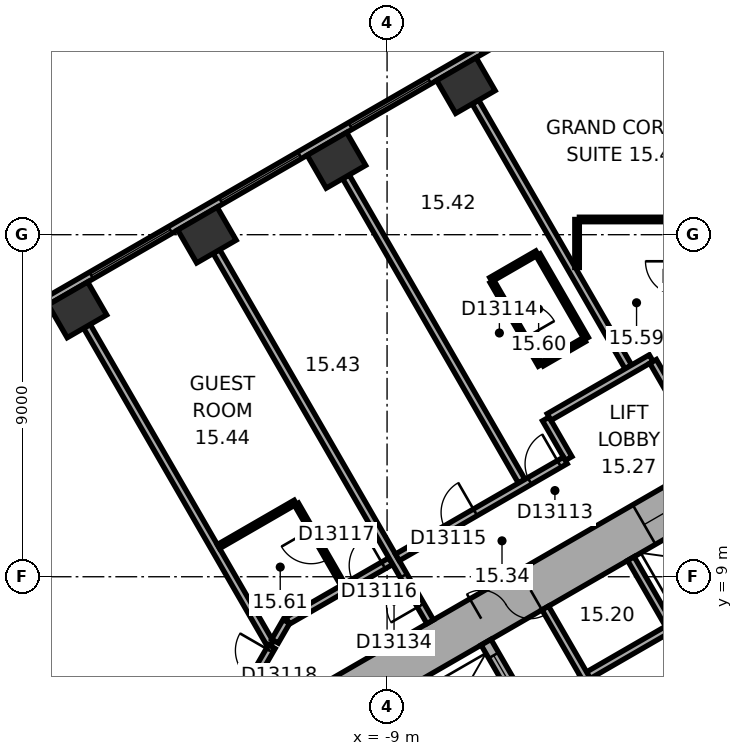
"""IFC4 building model, lengths in metres.
Left out: names, types, materials, properties, quantities, classifications, styles, units other than length and angle.
Written with IfcOpenShell. Run it as: python <this file> out.ifc"""

import sys

from ifc_helpers import new_model, si_unit, direction, frame, frame_2d, origin, origin_2d, place, context, subcontext, project, spatial, rectangle, extrude, element, fill, save


model = new_model("IFC4")
c1 = context("Model", 3, precision=1e-05, world=origin(), true_north=direction((0.0, 1.0)))
c2 = subcontext(c1, "Body", "Model", "MODEL_VIEW")
j1 = project(units=[si_unit("LENGTHUNIT", "METRE"), si_unit("PLANEANGLEUNIT", "RADIAN")], contexts=[c1])
p1 = place(None, origin())
s1 = spatial("IfcSite", under=j1, at=p1, CompositionType="ELEMENT")
p2 = place(p1, origin())
s2 = spatial("IfcBuilding", under=s1, at=p2, CompositionType="ELEMENT")
p3 = place(p2, frame((0.0, 0.0, 70.4)))
s3 = spatial("IfcBuildingStorey", under=s2, at=p3, CompositionType="ELEMENT", Elevation=70.4)
for number, where, z_axis, x_axis in (
    (1, (-6.926, 21.925, 0.0), (0.0, 0.0, 1.0), (-0.866, -0.5, 0.0)),
    (2, (-10.333, 19.957, 0.0), (0.0, 0.0, 1.0), (-0.866, -0.5, 0.0)),
    (3, (-13.74, 17.99, 0.0), (0.0, 0.0, 1.0), (-0.866, -0.5, 0.0)),
    (4, (-17.148, 16.023, 0.0), (0.0, 0.0, 1.0), (-0.866, -0.5, 0.0)),
):
    element("IfcColumn", number, at=place(p3, frame(where, z_axis=z_axis, x_axis=x_axis)), inside=s3, PredefinedType="COLUMN", context=c2, shape_type="SweptSolid", body=[
        extrude(rectangle(XDim=1.2, YDim=1.0, at=origin_2d()), origin(), (0.0, 0.0, 1.0), 3.3),
    ])
p4 = place(p3, frame((0.3, 11.836, 0.0), z_axis=(0.0, 0.0, 1.0), x_axis=(-0.866021384402, -0.500006961711, 0.0)))
e5 = element("IfcWall", 5, at=p4, inside=s3, PredefinedType="SHEAR", context=c2, shape_type="SweptSolid", body=[
    extrude(rectangle(XDim=12.355, YDim=1.2, at=frame_2d((6.178, 0.0))), origin(), (0.0, 0.0, 1.0), 3.3),
])
p5 = place(p4, frame((6.378, 0.0, 0.0)))
e6 = element("IfcOpeningElement", 6, at=p5, cuts=e5, PredefinedType="OPENING", context=c2, shape_type="SweptSolid", body=[
    extrude(rectangle(XDim=1.5, YDim=2.1, at=frame_2d((0.75, 1.05))), frame((0.0, 0.61, 0.0), z_axis=(0.0, -1.0, 0.0), x_axis=(1.0, 0.0, 0.0)), (0.0, 0.0, 1.0), 1.22),
])
p6 = place(p4, frame((1.828, 0.0, 0.0)))
e7 = element("IfcOpeningElement", 7, at=p6, cuts=e5, PredefinedType="OPENING", context=c2, shape_type="SweptSolid", body=[
    extrude(rectangle(XDim=1.1, YDim=2.1, at=frame_2d((0.55, 1.05))), frame((0.0, 0.61, 0.0), z_axis=(0.0, -1.0, 0.0), x_axis=(1.0, 0.0, 0.0)), (0.0, 0.0, 1.0), 1.22),
])
p7 = place(p3, frame((-3.136, 24.805, 0.0), z_axis=(0.0, 0.0, 1.0), x_axis=(-0.866028291626, -0.499994998079, 0.0)))
e8 = element("IfcWall", 8, at=p7, inside=s3, PredefinedType="STANDARD", context=c2, shape_type="SweptSolid", body=[
    extrude(rectangle(XDim=21.246, YDim=0.2, at=frame_2d((10.623, 0.0))), origin(), (0.0, 0.0, 1.0), 3.3),
])
p8 = place(p7, frame((1.555, 0.0, 0.8)))
e9 = element("IfcOpeningElement", 9, at=p8, cuts=e8, PredefinedType="OPENING", context=c2, shape_type="SweptSolid", body=[
    extrude(rectangle(XDim=2.4, YDim=1.7, at=frame_2d((1.2, 0.85))), frame((0.0, 0.11, 0.0), z_axis=(0.0, -1.0, 0.0), x_axis=(1.0, 0.0, 0.0)), (0.0, 0.0, 1.0), 0.22),
])
p9 = place(p7, frame((5.489, 0.0, 0.8)))
e10 = element("IfcOpeningElement", 10, at=p9, cuts=e8, PredefinedType="OPENING", context=c2, shape_type="SweptSolid", body=[
    extrude(rectangle(XDim=2.4, YDim=1.7, at=frame_2d((1.2, 0.85))), frame((0.0, 0.11, 0.0), z_axis=(0.0, -1.0, 0.0), x_axis=(1.0, 0.0, 0.0)), (0.0, 0.0, 1.0), 0.22),
])
p10 = place(p7, frame((9.424, 0.0, 0.8)))
e11 = element("IfcOpeningElement", 11, at=p10, cuts=e8, PredefinedType="OPENING", context=c2, shape_type="SweptSolid", body=[
    extrude(rectangle(XDim=2.4, YDim=1.7, at=frame_2d((1.2, 0.85))), frame((0.0, 0.11, 0.0), z_axis=(0.0, -1.0, 0.0), x_axis=(1.0, 0.0, 0.0)), (0.0, 0.0, 1.0), 0.22),
])
p11 = place(p7, frame((13.358, 0.0, 0.8)))
e12 = element("IfcOpeningElement", 12, at=p11, cuts=e8, PredefinedType="OPENING", context=c2, shape_type="SweptSolid", body=[
    extrude(rectangle(XDim=2.4, YDim=1.7, at=frame_2d((1.2, 0.85))), frame((0.0, 0.11, 0.0), z_axis=(0.0, -1.0, 0.0), x_axis=(1.0, 0.0, 0.0)), (0.0, 0.0, 1.0), 0.22),
])
p12 = place(p7, frame((17.293, 0.0, 0.8)))
e13 = element("IfcOpeningElement", 13, at=p12, cuts=e8, PredefinedType="OPENING", context=c2, shape_type="SweptSolid", body=[
    extrude(rectangle(XDim=2.4, YDim=1.7, at=frame_2d((1.2, 0.85))), frame((0.0, 0.11, 0.0), z_axis=(0.0, -1.0, 0.0), x_axis=(1.0, 0.0, 0.0)), (0.0, 0.0, 1.0), 0.22),
])
p13 = place(p3, frame((0.803, 9.009, 0.0), z_axis=(0.0, 0.0, 1.0), x_axis=(-0.866028230842, -0.499995103361, 0.0)))
e14 = element("IfcWall", 14, at=p13, inside=s3, PredefinedType="PARTITIONING", context=c2, shape_type="SweptSolid", body=[
    extrude(rectangle(XDim=5.4, YDim=0.2, at=frame_2d((2.7, 0.0))), origin(), (0.0, 0.0, 1.0), 3.05),
])
for number, where, z_axis, x_axis in (
    (15, (-1.485, 7.572, 0.0), (0.0, 0.0, 1.0), (-0.5, 0.866, 0.0)),
    (16, (-3.737, 6.272, 0.0), (0.0, 0.0, 1.0), (-0.5, 0.866, 0.0)),
):
    element("IfcWall", number, at=place(p3, frame(where, z_axis=z_axis, x_axis=x_axis)), inside=s3, PredefinedType="PARTITIONING", context=c2, shape_type="SweptSolid", body=[
        extrude(rectangle(XDim=2.2, YDim=0.2, at=frame_2d((1.1, 0.0))), origin(), (0.0, 0.0, 1.0), 3.05),
    ])
p14 = place(p3, frame((-2.216, 4.282, 0.0), z_axis=(0.0, 0.0, 1.0), x_axis=(0.499977259774, 0.866038532462, 0.0)))
e17 = element("IfcWall", 17, at=p14, inside=s3, PredefinedType="SHEAR", context=c2, shape_type="SweptSolid", body=[
    extrude(rectangle(XDim=4.7, YDim=0.3, at=frame_2d((2.35, 0.0))), origin(), (0.0, 0.0, 1.0), 3.05),
])
p15 = place(p3, frame((-5.295, 5.372, 0.0), z_axis=(0.0, 0.0, 1.0), x_axis=(-0.500077893725, 0.86598042715, 0.0)))
e18 = element("IfcWall", 18, at=p15, inside=s3, PredefinedType="SHEAR", context=c2, shape_type="SweptSolid", body=[
    extrude(rectangle(XDim=2.2, YDim=0.3, at=frame_2d((1.1, 0.0))), origin(), (0.0, 0.0, 1.0), 3.05),
])
p16 = place(p15, frame((0.7, 0.0, 0.0)))
e19 = element("IfcOpeningElement", 19, at=p16, cuts=e18, PredefinedType="OPENING", context=c2, shape_type="SweptSolid", body=[
    extrude(rectangle(XDim=1.1, YDim=2.1, at=frame_2d((0.55, 1.05))), frame((0.0, 0.16, 0.0), z_axis=(0.0, -1.0, 0.0), x_axis=(1.0, 0.0, 0.0)), (0.0, 0.0, 1.0), 0.32),
])
p17 = place(p3, frame((-16.898, 15.59, 0.0), z_axis=(0.0, 0.0, 1.0), x_axis=(0.499994742786, -0.866028439017, 0.0)))
e20 = element("IfcWall", 20, at=p17, inside=s3, PredefinedType="PARTITIONING", context=c2, shape_type="SweptSolid", body=[
    extrude(rectangle(XDim=9.65, YDim=0.2, at=frame_2d((4.825, 0.0))), origin(), (0.0, 0.0, 1.0), 3.05),
])
p18 = place(p3, frame((-13.436, 9.794, 0.0), z_axis=(0.0, 0.0, 1.0), x_axis=(0.866053246676, 0.499951771596, 0.0)))
e21 = element("IfcWall", 21, at=p18, inside=s3, PredefinedType="PARTITIONING", context=c2, shape_type="SweptSolid", body=[
    extrude(rectangle(XDim=2.335, YDim=0.12, at=frame_2d((1.167, 0.0))), origin(), (0.0, 0.0, 1.0), 3.05),
])
p19 = place(p3, frame((-12.032, 7.162, 0.0), z_axis=(0.0, 0.0, 1.0), x_axis=(-0.499951829968, -0.866053212979, 0.0)))
e22 = element("IfcWall", 22, at=p19, inside=s3, PredefinedType="PARTITIONING", context=c2, shape_type="SweptSolid", body=[
    extrude(rectangle(XDim=1.136, YDim=0.2, at=frame_2d((0.568, 0.0))), origin(), (0.0, 0.0, 1.0), 3.05),
])
p20 = place(p19, frame((0.118, 0.0, 0.0)))
e23 = element("IfcOpeningElement", 23, at=p20, cuts=e22, PredefinedType="OPENING", context=c2, shape_type="SweptSolid", body=[
    extrude(rectangle(XDim=0.9, YDim=2.1, at=frame_2d((0.45, 1.05))), frame((0.0, 0.11, 0.0), z_axis=(0.0, -1.0, 0.0), x_axis=(1.0, 0.0, 0.0)), (0.0, 0.0, 1.0), 0.22),
])
p21 = place(p3, frame((-11.65, 7.823, 0.0), z_axis=(0.0, 0.0, 1.0), x_axis=(-0.50012165622, -0.865955154139, 0.0)))
e24 = element("IfcWall", 24, at=p21, inside=s3, PredefinedType="PARTITIONING", context=c2, shape_type="SweptSolid", body=[
    extrude(rectangle(XDim=0.6, YDim=0.2, at=frame_2d((0.3, 0.0))), origin(), (0.0, 0.0, 1.0), 3.05),
])
p22 = place(p3, frame((-11.385, 10.909, 0.0), z_axis=(0.0, 0.0, 1.0), x_axis=(0.500077547548, -0.865980627057, 0.0)))
e25 = element("IfcWall", 25, at=p22, inside=s3, PredefinedType="PARTITIONING", context=c2, shape_type="SweptSolid", body=[
    extrude(rectangle(XDim=2.44, YDim=0.12, at=frame_2d((1.22, 0.0))), origin(), (0.0, 0.0, 1.0), 3.05),
])
p23 = place(p22, frame((0.77, 0.0, 0.0)))
e26 = element("IfcOpeningElement", 26, at=p23, cuts=e25, PredefinedType="OPENING", context=c2, shape_type="SweptSolid", body=[
    extrude(rectangle(XDim=0.9, YDim=2.1, at=frame_2d((0.45, 1.05))), frame((0.0, 0.07, 0.0), z_axis=(0.0, -1.0, 0.0), x_axis=(1.0, 0.0, 0.0)), (0.0, 0.0, 1.0), 0.14),
])
p24 = place(p3, frame((-10.083, 19.524, 0.0), z_axis=(0.0, 0.0, 1.0), x_axis=(0.499999662836, -0.866025598446, 0.0)))
e27 = element("IfcWall", 27, at=p24, inside=s3, PredefinedType="PARTITIONING", context=c2, shape_type="SweptSolid", body=[
    extrude(rectangle(XDim=9.25, YDim=0.2, at=frame_2d((4.625, 0.0))), origin(), (0.0, 0.0, 1.0), 2.6),
])
p25 = place(p3, frame((-8.902, 9.41, 0.0), z_axis=(0.0, 0.0, 1.0), x_axis=(-0.866014299198, -0.500019233215, 0.0)))
e28 = element("IfcWall", 28, at=p25, inside=s3, PredefinedType="PARTITIONING", context=c2, shape_type="SweptSolid", body=[
    extrude(rectangle(XDim=3.133, YDim=0.2, at=frame_2d((1.567, 0.0))), origin(), (0.0, 0.0, 1.0), 3.05),
])
p26 = place(p25, frame((0.225, 0.0, 0.0)))
e29 = element("IfcOpeningElement", 29, at=p26, cuts=e28, PredefinedType="OPENING", context=c2, shape_type="SweptSolid", body=[
    extrude(rectangle(XDim=0.9, YDim=2.1, at=frame_2d((0.45, 1.05))), frame((0.0, 0.11, 0.0), z_axis=(0.0, -1.0, 0.0), x_axis=(1.0, 0.0, 0.0)), (0.0, 0.0, 1.0), 0.22),
])
p27 = place(p3, frame((-7.865, 7.814, 0.0), z_axis=(0.0, 0.0, 1.0), x_axis=(-0.500004234368, 0.866022959057, 0.0)))
e30 = element("IfcWall", 30, at=p27, inside=s3, PredefinedType="PARTITIONING", context=c2, shape_type="SweptSolid", body=[
    extrude(rectangle(XDim=11.25, YDim=0.2, at=frame_2d((5.625, 0.0))), origin(), (0.0, 0.0, 1.0), 3.05),
])
p28 = place(p27, frame((0.5, 0.0, 0.0)))
e31 = element("IfcOpeningElement", 31, at=p28, cuts=e30, PredefinedType="OPENING", context=c2, shape_type="SweptSolid", body=[
    extrude(rectangle(XDim=0.9, YDim=2.1, at=frame_2d((0.45, 1.05))), frame((0.0, 0.11, 0.0), z_axis=(0.0, -1.0, 0.0), x_axis=(1.0, 0.0, 0.0)), (0.0, 0.0, 1.0), 0.22),
])
p29 = place(p3, frame((-6.676, 21.492, 0.0), z_axis=(0.0, 0.0, 1.0), x_axis=(0.500011263043, -0.866018900966, 0.0)))
e32 = element("IfcWall", 32, at=p29, inside=s3, PredefinedType="PARTITIONING", context=c2, shape_type="SweptSolid", body=[
    extrude(rectangle(XDim=8.049, YDim=0.2, at=frame_2d((4.024, 0.0))), origin(), (0.0, 0.0, 1.0), 3.05),
])
p30 = place(p3, frame((-6.268, 16.82, 0.0), z_axis=(0.0, 0.0, 1.0), x_axis=(0.866002662425, 0.500039387122, 0.0)))
e33 = element("IfcWall", 33, at=p30, inside=s3, PredefinedType="PARTITIONING", context=c2, shape_type="SweptSolid", body=[
    extrude(rectangle(XDim=1.4, YDim=0.12, at=frame_2d((0.7, 0.0))), origin(), (0.0, 0.0, 1.0), 3.05),
])
p31 = place(p3, frame((-5.026, 17.469, 0.0), z_axis=(0.0, 0.0, 1.0), x_axis=(0.500005339912, -0.866022320763, 0.0)))
e34 = element("IfcWall", 34, at=p31, inside=s3, PredefinedType="PARTITIONING", context=c2, shape_type="SweptSolid", body=[
    extrude(rectangle(XDim=2.54, YDim=0.12, at=frame_2d((1.27, 0.0))), origin(), (0.0, 0.0, 1.0), 3.05),
])
p32 = place(p3, frame((-4.968, 14.569, 0.0), z_axis=(0.0, 0.0, 1.0), x_axis=(-0.500046963369, 0.865998287773, 0.0)))
e35 = element("IfcWall", 35, at=p32, inside=s3, PredefinedType="PARTITIONING", context=c2, shape_type="SweptSolid", body=[
    extrude(rectangle(XDim=2.54, YDim=0.12, at=frame_2d((1.27, 0.0))), origin(), (0.0, 0.0, 1.0), 3.05),
])
p33 = place(p32, frame((0.82, 0.0, 0.0)))
e36 = element("IfcOpeningElement", 36, at=p33, cuts=e35, PredefinedType="OPENING", context=c2, shape_type="SweptSolid", body=[
    extrude(rectangle(XDim=0.9, YDim=2.1, at=frame_2d((0.45, 1.05))), frame((0.0, 0.07, 0.0), z_axis=(0.0, -1.0, 0.0), x_axis=(1.0, 0.0, 0.0)), (0.0, 0.0, 1.0), 0.14),
])
p34 = place(p3, frame((-4.823, 13.152, 0.0), z_axis=(0.0, 0.0, 1.0), x_axis=(0.499986357472, -0.866033280158, 0.0)))
e37 = element("IfcWall", 37, at=p34, inside=s3, PredefinedType="PARTITIONING", context=c2, shape_type="SweptSolid", body=[
    extrude(rectangle(XDim=1.201, YDim=0.2, at=frame_2d((0.601, 0.0))), origin(), (0.0, 0.0, 1.0), 3.05),
])
p35 = place(p3, frame((-4.309, 12.061, 0.0), z_axis=(0.0, 0.0, 1.0), x_axis=(-0.866020679205, -0.500008183122, 0.0)))
e38 = element("IfcWall", 38, at=p35, inside=s3, PredefinedType="PARTITIONING", context=c2, shape_type="SweptSolid", body=[
    extrude(rectangle(XDim=5.104, YDim=0.2, at=frame_2d((2.552, 0.0))), origin(), (0.0, 0.0, 1.0), 3.05),
])
p36 = place(p35, frame((0.185, 0.0, 0.0)))
e39 = element("IfcOpeningElement", 39, at=p36, cuts=e38, PredefinedType="OPENING", context=c2, shape_type="SweptSolid", body=[
    extrude(rectangle(XDim=0.9, YDim=2.1, at=frame_2d((0.45, 1.05))), frame((0.0, 0.11, 0.0), z_axis=(0.0, -1.0, 0.0), x_axis=(1.0, 0.0, 0.0)), (0.0, 0.0, 1.0), 0.22),
])
p37 = place(p35, frame((2.736, 0.0, 0.0)))
e40 = element("IfcOpeningElement", 40, at=p37, cuts=e38, PredefinedType="OPENING", context=c2, shape_type="SweptSolid", body=[
    extrude(rectangle(XDim=0.9, YDim=2.1, at=frame_2d((0.45, 1.05))), frame((0.0, 0.11, 0.0), z_axis=(0.0, -1.0, 0.0), x_axis=(1.0, 0.0, 0.0)), (0.0, 0.0, 1.0), 0.22),
])
p38 = place(p3, frame((-4.0, 17.137, 0.0), z_axis=(0.0, 0.0, 1.0), x_axis=(0.0, 1.0, 0.0)))
e41 = element("IfcWall", 41, at=p38, inside=s3, PredefinedType="PARTITIONING", context=c2, shape_type="SweptSolid", body=[
    extrude(rectangle(XDim=1.263, YDim=0.12, at=frame_2d((0.632, 0.0))), origin(), (0.0, 0.0, 1.0), 3.05),
])
p39 = place(p3, frame((-3.94, 18.401, 0.0), z_axis=(0.0, 0.0, 1.0), x_axis=(1.0, 0.0, 0.0)))
e42 = element("IfcWall", 42, at=p39, inside=s3, PredefinedType="PARTITIONING", context=c2, shape_type="SweptSolid", body=[
    extrude(rectangle(XDim=2.64, YDim=0.12, at=frame_2d((1.32, 0.0))), origin(), (0.0, 0.0, 1.0), 3.05),
])
p40 = place(p3, frame((-3.808, 15.239, 0.0), z_axis=(0.0, 0.0, 1.0), x_axis=(-0.866087136806, -0.499893060024, 0.0)))
e43 = element("IfcWall", 43, at=p40, inside=s3, PredefinedType="PARTITIONING", context=c2, shape_type="SweptSolid", body=[
    extrude(rectangle(XDim=1.28, YDim=0.12, at=frame_2d((0.64, 0.0))), origin(), (0.0, 0.0, 1.0), 3.05),
])
p41 = place(p3, frame((-2.05, 14.752, 0.0), z_axis=(0.0, 0.0, 1.0), x_axis=(-0.866030936828, -0.499990416364, 0.0)))
e44 = element("IfcWall", 44, at=p41, inside=s3, PredefinedType="PARTITIONING", context=c2, shape_type="SweptSolid", body=[
    extrude(rectangle(XDim=3.102, YDim=0.2, at=frame_2d((1.551, 0.0))), origin(), (0.0, 0.0, 1.0), 3.05),
])
p42 = place(p3, frame((-1.449, 13.712, 0.0), z_axis=(0.0, 0.0, 1.0), x_axis=(-0.499978356969, 0.866037899034, 0.0)))
e45 = element("IfcWall", 45, at=p42, inside=s3, PredefinedType="PARTITIONING", context=c2, shape_type="SweptSolid", body=[
    extrude(rectangle(XDim=1.101, YDim=0.2, at=frame_2d((0.551, 0.0))), origin(), (0.0, 0.0, 1.0), 3.05),
])
p43 = place(p3, frame((-1.3, 15.301, 0.0), z_axis=(0.0, 0.0, 1.0), x_axis=(-1.0, 0.0, 0.0)))
e46 = element("IfcWall", 46, at=p43, inside=s3, PredefinedType="PARTITIONING", context=c2, shape_type="SweptSolid", body=[
    extrude(rectangle(XDim=1.661, YDim=0.12, at=frame_2d((0.831, 0.0))), origin(), (0.0, 0.0, 1.0), 3.05),
])
p44 = place(p9, origin())
e47 = element("IfcWindow", 47, at=p44, inside=s3, PartitioningType="SINGLE_PANEL", PredefinedType="WINDOW", context=c2, shape_type="SweptSolid", body=[
    extrude(rectangle(XDim=2.4, YDim=1.7, at=frame_2d((1.2, 0.85))), frame((0.0, 0.03, 0.0), z_axis=(0.0, -1.0, 0.0), x_axis=(1.0, 0.0, 0.0)), (0.0, 0.0, 1.0), 0.06),
])
fill(e10, e47)
p45 = place(p10, origin())
e48 = element("IfcWindow", 48, at=p45, inside=s3, PartitioningType="SINGLE_PANEL", PredefinedType="WINDOW", context=c2, shape_type="SweptSolid", body=[
    extrude(rectangle(XDim=2.4, YDim=1.7, at=frame_2d((1.2, 0.85))), frame((0.0, 0.03, 0.0), z_axis=(0.0, -1.0, 0.0), x_axis=(1.0, 0.0, 0.0)), (0.0, 0.0, 1.0), 0.06),
])
fill(e11, e48)
p46 = place(p11, origin())
e49 = element("IfcWindow", 49, at=p46, inside=s3, PartitioningType="SINGLE_PANEL", PredefinedType="WINDOW", context=c2, shape_type="SweptSolid", body=[
    extrude(rectangle(XDim=2.4, YDim=1.7, at=frame_2d((1.2, 0.85))), frame((0.0, 0.03, 0.0), z_axis=(0.0, -1.0, 0.0), x_axis=(1.0, 0.0, 0.0)), (0.0, 0.0, 1.0), 0.06),
])
fill(e12, e49)
p47 = place(p5, origin())
e50 = element("IfcDoor", 50, at=p47, inside=s3, OperationType="DOUBLE_DOOR_SINGLE_SWING", PredefinedType="DOOR", context=c2, shape_type="SweptSolid", body=[
    extrude(rectangle(XDim=1.5, YDim=2.1, at=frame_2d((0.75, 1.05))), frame((0.0, 0.025, 0.0), z_axis=(0.0, -1.0, 0.0), x_axis=(1.0, 0.0, 0.0)), (0.0, 0.0, 1.0), 0.05),
])
fill(e6, e50)
p48 = place(p16, origin())
e51 = element("IfcDoor", 51, at=p48, inside=s3, OperationType="DOUBLE_DOOR_SLIDING", PredefinedType="DOOR", context=c2, shape_type="SweptSolid", body=[
    extrude(rectangle(XDim=1.1, YDim=2.1, at=frame_2d((0.55, 1.05))), frame((0.0, 0.025, 0.0), z_axis=(0.0, -1.0, 0.0), x_axis=(1.0, 0.0, 0.0)), (0.0, 0.0, 1.0), 0.05),
])
fill(e19, e51)
p49 = place(p6, origin())
e52 = element("IfcDoor", 52, at=p49, inside=s3, OperationType="DOUBLE_DOOR_SLIDING", PredefinedType="DOOR", context=c2, shape_type="SweptSolid", body=[
    extrude(rectangle(XDim=1.1, YDim=2.1, at=frame_2d((0.55, 1.05))), frame((0.0, 0.025, 0.0), z_axis=(0.0, -1.0, 0.0), x_axis=(1.0, 0.0, 0.0)), (0.0, 0.0, 1.0), 0.05),
])
fill(e7, e52)
p50 = place(p36, origin())
e53 = element("IfcDoor", 53, at=p50, inside=s3, OperationType="SINGLE_SWING_LEFT", PredefinedType="DOOR", context=c2, shape_type="SweptSolid", body=[
    extrude(rectangle(XDim=0.9, YDim=2.1, at=frame_2d((0.45, 1.05))), frame((0.0, 0.025, 0.0), z_axis=(0.0, -1.0, 0.0), x_axis=(1.0, 0.0, 0.0)), (0.0, 0.0, 1.0), 0.05),
])
fill(e39, e53)
p51 = place(p33, origin())
e54 = element("IfcDoor", 54, at=p51, inside=s3, OperationType="SINGLE_SWING_LEFT", PredefinedType="DOOR", context=c2, shape_type="SweptSolid", body=[
    extrude(rectangle(XDim=0.9, YDim=2.1, at=frame_2d((0.45, 1.05))), frame((0.0, 0.025, 0.0), z_axis=(0.0, -1.0, 0.0), x_axis=(1.0, 0.0, 0.0)), (0.0, 0.0, 1.0), 0.05),
])
fill(e36, e54)
p52 = place(p37, origin())
e55 = element("IfcDoor", 55, at=p52, inside=s3, OperationType="SINGLE_SWING_LEFT", PredefinedType="DOOR", context=c2, shape_type="SweptSolid", body=[
    extrude(rectangle(XDim=0.9, YDim=2.1, at=frame_2d((0.45, 1.05))), frame((0.0, 0.025, 0.0), z_axis=(0.0, -1.0, 0.0), x_axis=(1.0, 0.0, 0.0)), (0.0, 0.0, 1.0), 0.05),
])
fill(e40, e55)
p53 = place(p26, origin())
e56 = element("IfcDoor", 56, at=p53, inside=s3, OperationType="SINGLE_SWING_LEFT", PredefinedType="DOOR", context=c2, shape_type="SweptSolid", body=[
    extrude(rectangle(XDim=0.9, YDim=2.1, at=frame_2d((0.45, 1.05))), frame((0.0, 0.025, 0.0), z_axis=(0.0, -1.0, 0.0), x_axis=(1.0, 0.0, 0.0)), (0.0, 0.0, 1.0), 0.05),
])
fill(e29, e56)
p54 = place(p23, origin())
e57 = element("IfcDoor", 57, at=p54, inside=s3, OperationType="SINGLE_SWING_LEFT", PredefinedType="DOOR", context=c2, shape_type="SweptSolid", body=[
    extrude(rectangle(XDim=0.9, YDim=2.1, at=frame_2d((0.45, 1.05))), frame((0.0, 0.025, 0.0), z_axis=(0.0, -1.0, 0.0), x_axis=(1.0, 0.0, 0.0)), (0.0, 0.0, 1.0), 0.05),
])
fill(e26, e57)
p55 = place(p20, origin())
e58 = element("IfcDoor", 58, at=p55, inside=s3, OperationType="SINGLE_SWING_LEFT", PredefinedType="DOOR", context=c2, shape_type="SweptSolid", body=[
    extrude(rectangle(XDim=0.9, YDim=2.1, at=frame_2d((0.45, 1.05))), frame((0.0, 0.025, 0.0), z_axis=(0.0, -1.0, 0.0), x_axis=(1.0, 0.0, 0.0)), (0.0, 0.0, 1.0), 0.05),
])
fill(e23, e58)
p56 = place(p28, origin())
e59 = element("IfcDoor", 59, at=p56, inside=s3, OperationType="SINGLE_SWING_LEFT", PredefinedType="DOOR", context=c2, shape_type="SweptSolid", body=[
    extrude(rectangle(XDim=0.9, YDim=2.1, at=frame_2d((0.45, 1.05))), frame((0.0, 0.025, 0.0), z_axis=(0.0, -1.0, 0.0), x_axis=(1.0, 0.0, 0.0)), (0.0, 0.0, 1.0), 0.05),
])
fill(e31, e59)
save(model, sys.argv[1])
